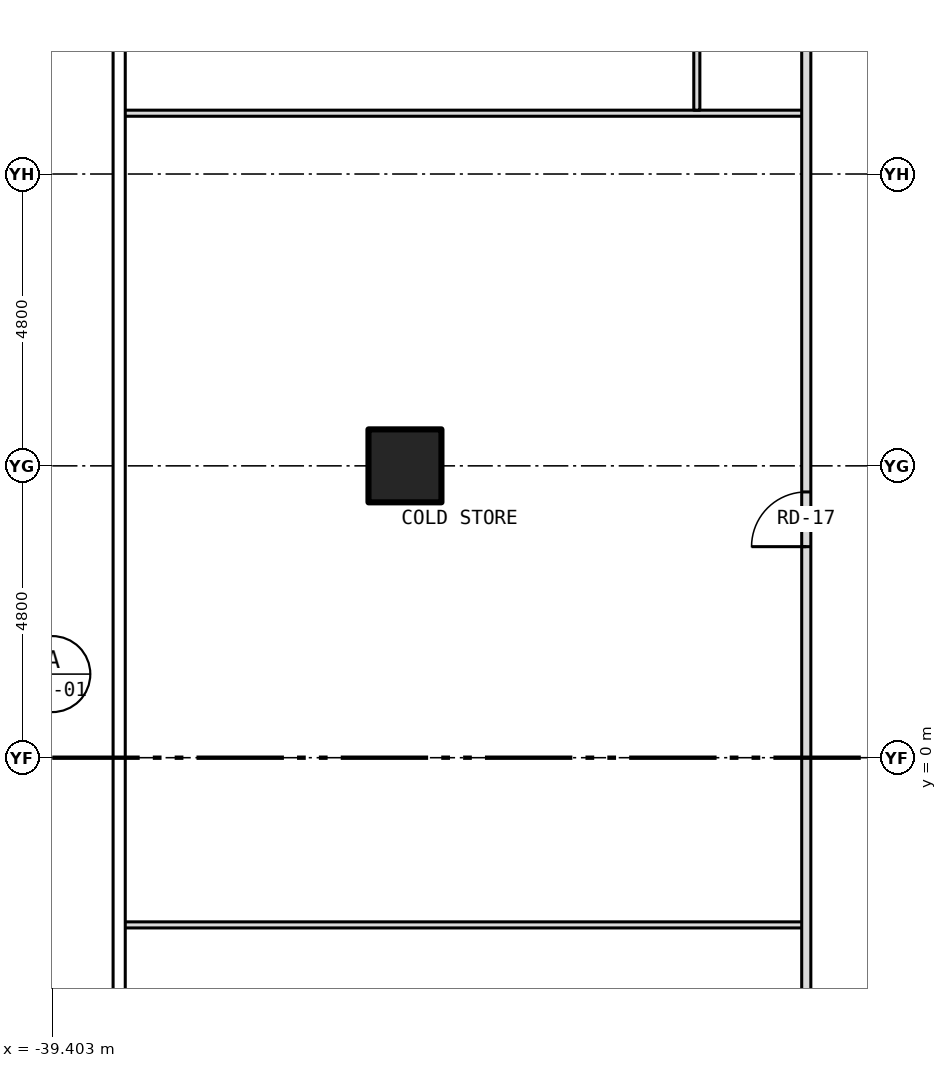
"""IFC4 building model, lengths in metres.
Left out: names, types, materials, properties, quantities, classifications, styles, units other than length and angle.
Written with IfcOpenShell. Run it as: python <this file> out.ifc"""

import sys

from ifc_helpers import new_model, si_unit, direction, frame, frame_2d, origin, origin_2d, place, context, subcontext, project, spatial, rectangle, hollow_rectangle, extrude, element, fill, save


model = new_model("IFC4")
c1 = context("Model", 3, precision=1e-05, world=origin(), true_north=direction((0.0, 1.0)))
c2 = subcontext(c1, "Body", "Model", "MODEL_VIEW")
j1 = project(units=[si_unit("LENGTHUNIT", "METRE"), si_unit("PLANEANGLEUNIT", "RADIAN")], contexts=[c1])
p1 = place(None, origin())
s1 = spatial("IfcSite", under=j1, at=p1, CompositionType="ELEMENT")
p2 = place(p1, origin())
s2 = spatial("IfcBuilding", under=s1, at=p2, CompositionType="ELEMENT")
p3 = place(p2, origin())
s3 = spatial("IfcBuildingStorey", under=s2, at=p3, CompositionType="ELEMENT", Elevation=0.0)
p4 = place(p3, frame((-33.6, 4.8, -0.3), z_axis=(0.0, 0.0, 1.0), x_axis=(1.0, 0.0, 0.0)))
e1 = element("IfcColumn", 1, at=p4, inside=s3, PredefinedType="COLUMN", context=c2, shape_type="SweptSolid", body=[
    extrude(hollow_rectangle(XDim=1.2, YDim=1.2, WallThickness=0.07, at=origin_2d()), origin(), (0.0, 0.0, 1.0), 7.55),
])
for number, where, z_axis, x_axis in (
    (2, (-38.28, -2.75, 0.0), (0.0, 0.0, 1.0), (1.0, 0.0, 0.0)),
    (3, (-38.28, 10.6, 0.0), (0.0, 0.0, 1.0), (1.0, 0.0, 0.0)),
):
    element("IfcWall", number, at=place(p3, frame(where, z_axis=z_axis, x_axis=x_axis)), inside=s3, PredefinedType="PARTITIONING", context=c2, shape_type="SweptSolid", body=[
        extrude(rectangle(XDim=11.28, YDim=0.1, at=frame_2d((5.64, 0.0))), origin(), (0.0, 0.0, 1.0), 7.25),
    ])
p5 = place(p3, frame((-28.8, 10.65, 0.0), z_axis=(0.0, 0.0, 1.0), x_axis=(0.0, 1.0, 0.0)))
e4 = element("IfcWall", 4, at=p5, inside=s3, PredefinedType="PARTITIONING", context=c2, shape_type="SweptSolid", body=[
    extrude(rectangle(XDim=3.596, YDim=0.1, at=frame_2d((1.798, 0.0))), origin(), (0.0, 0.0, 1.0), 6.633),
])
p6 = place(p3, frame((-27.0, -9.225, 0.0), z_axis=(0.0, 0.0, 1.0), x_axis=(0.0, 1.0, 0.0)))
e5 = element("IfcWall", 5, at=p6, inside=s3, PredefinedType="PARTITIONING", context=c2, shape_type="SweptSolid", body=[
    extrude(rectangle(XDim=22.95, YDim=0.15, at=frame_2d((11.475, 0.0))), origin(), (0.0, 0.0, 1.0), 7.25),
])
p7 = place(p6, frame((2.739, 0.0, 0.0)))
e6 = element("IfcOpeningElement", 6, at=p7, cuts=e5, PredefinedType="OPENING", context=c2, shape_type="SweptSolid", body=[
    extrude(rectangle(XDim=0.9, YDim=2.1, at=frame_2d((0.45, 1.05))), frame((0.0, 0.087, 0.0), z_axis=(0.0, -1.0, 0.0), x_axis=(1.0, 0.0, 0.0)), (0.0, 0.0, 1.0), 0.174),
])
p8 = place(p6, frame((12.696, 0.0, 0.0)))
e7 = element("IfcOpeningElement", 7, at=p8, cuts=e5, PredefinedType="OPENING", context=c2, shape_type="SweptSolid", body=[
    extrude(rectangle(XDim=0.9, YDim=2.1, at=frame_2d((0.45, 1.05))), frame((0.0, 0.087, 0.0), z_axis=(0.0, -1.0, 0.0), x_axis=(1.0, 0.0, 0.0)), (0.0, 0.0, 1.0), 0.174),
])
p9 = place(p8, origin())
e8 = element("IfcDoor", 8, at=p9, inside=s3, OperationType="SINGLE_SWING_LEFT", PredefinedType="DOOR", context=c2, shape_type="SweptSolid", body=[
    extrude(rectangle(XDim=0.9, YDim=2.1, at=frame_2d((0.45, 1.05))), frame((0.0, 0.025, 0.0), z_axis=(0.0, -1.0, 0.0), x_axis=(1.0, 0.0, 0.0)), (0.0, 0.0, 1.0), 0.05),
])
fill(e7, e8)
save(model, sys.argv[1])
